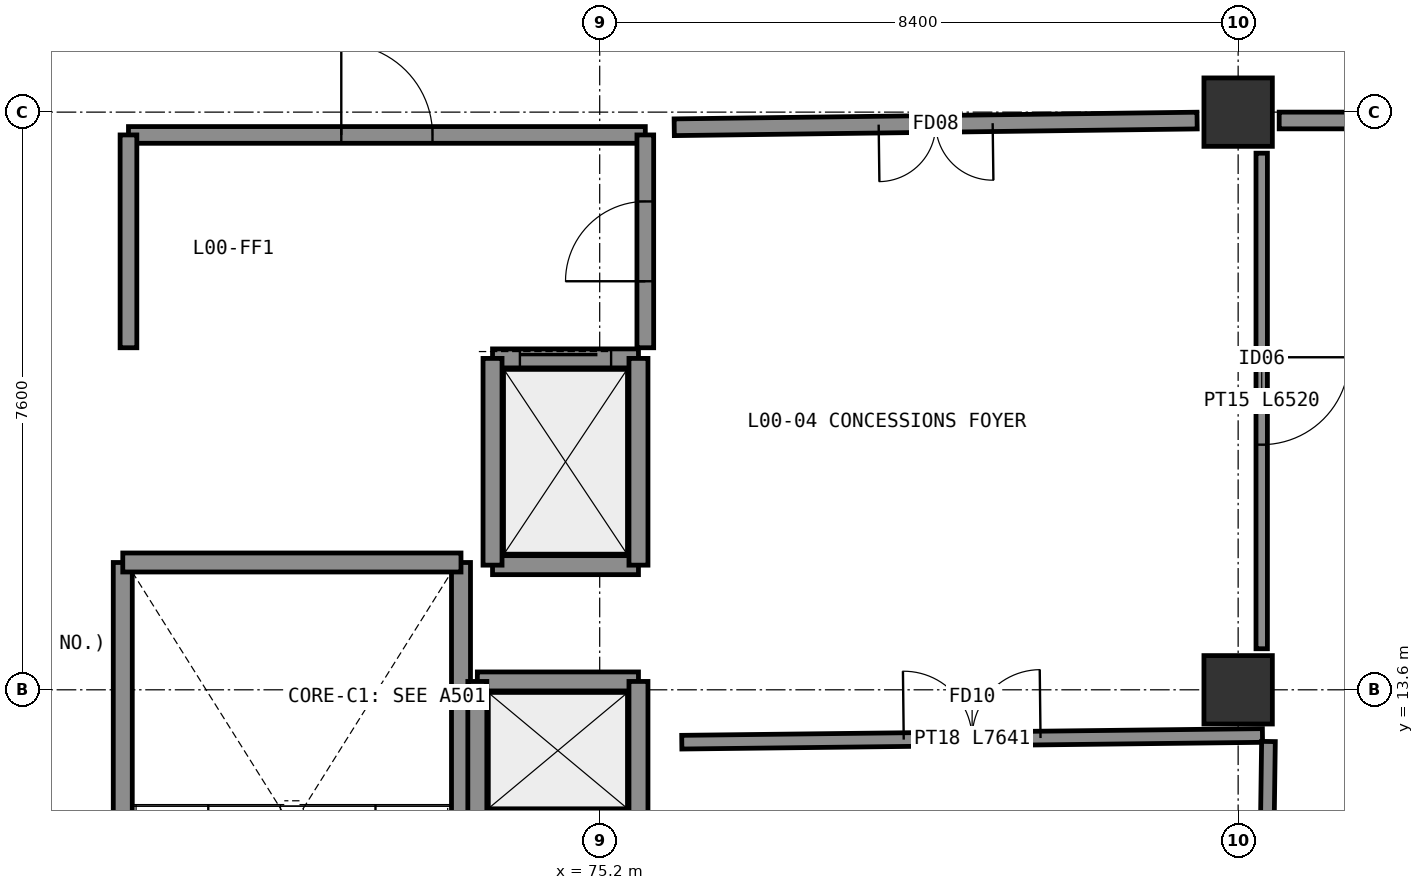
"""IFC4 building model, lengths in metres.
Left out: names, types, materials, properties, quantities, classifications, styles, units other than length and angle.
Written with IfcOpenShell. Run it as: python <this file> out.ifc"""

import sys

from ifc_helpers import new_model, si_unit, direction, frame, frame_2d, origin, origin_2d, place, context, subcontext, project, spatial, rectangle, extrude, element, fill, save


model = new_model("IFC4")
c1 = context("Model", 3, precision=1e-05, world=origin(), true_north=direction((0.0, 1.0)))
c2 = subcontext(c1, "Body", "Model", "MODEL_VIEW")
j1 = project(units=[si_unit("LENGTHUNIT", "METRE"), si_unit("PLANEANGLEUNIT", "RADIAN")], contexts=[c1])
p1 = place(None, origin())
s1 = spatial("IfcSite", under=j1, at=p1, CompositionType="ELEMENT")
p2 = place(p1, origin())
s2 = spatial("IfcBuilding", under=s1, at=p2, CompositionType="ELEMENT")
p3 = place(p2, origin())
s3 = spatial("IfcBuildingStorey", under=s2, at=p3, CompositionType="ELEMENT", Elevation=0.0)
for number, where, z_axis, x_axis in (
    (1, (83.6, 13.6, 0.0), (0.0, 0.0, 1.0), (1.0, 0.0, 0.0)),
    (2, (83.6, 21.2, 0.0), (0.0, 0.0, 1.0), (1.0, 0.0, 0.0)),
):
    element("IfcColumn", number, at=place(p3, frame(where, z_axis=z_axis, x_axis=x_axis)), inside=s3, PredefinedType="COLUMN", context=c2, shape_type="SweptSolid", body=[
        extrude(rectangle(XDim=0.9, YDim=0.9, at=origin_2d()), origin(), (0.0, 0.0, 1.0), 4.8),
    ])
p4 = place(p3, frame((68.925, 6.225, 0.0), z_axis=(0.0, 0.0, 1.0), x_axis=(0.0, 1.0, 0.0)))
e3 = element("IfcWall", 3, at=p4, inside=s3, PredefinedType="SHEAR", context=c2, shape_type="SweptSolid", body=[
    extrude(rectangle(XDim=9.05, YDim=0.25, at=frame_2d((4.525, 0.0))), origin(), (0.0, 0.0, 1.0), 4.52),
])
p5 = place(p4, frame((0.55, 0.0, 0.0)))
e4 = element("IfcOpeningElement", 4, at=p5, cuts=e3, PredefinedType="OPENING", context=c2, shape_type="SweptSolid", body=[
    extrude(rectangle(XDim=1.05, YDim=2.1, at=frame_2d((0.525, 1.05))), frame((0.0, 0.135, 0.0), z_axis=(0.0, -1.0, 0.0), x_axis=(1.0, 0.0, 0.0)), (0.0, 0.0, 1.0), 0.27),
])
p6 = place(p3, frame((73.375, 6.225, 0.0), z_axis=(0.0, 0.0, 1.0), x_axis=(0.0, 1.0, 0.0)))
e5 = element("IfcWall", 5, at=p6, inside=s3, PredefinedType="SHEAR", context=c2, shape_type="SweptSolid", body=[
    extrude(rectangle(XDim=9.05, YDim=0.25, at=frame_2d((4.525, 0.0))), origin(), (0.0, 0.0, 1.0), 4.52),
])
p7 = place(p3, frame((68.925, 15.275, 0.0), z_axis=(0.0, 0.0, 1.0), x_axis=(1.0, 0.0, 0.0)))
e6 = element("IfcWall", 6, at=p7, inside=s3, PredefinedType="SHEAR", context=c2, shape_type="SweptSolid", body=[
    extrude(rectangle(XDim=4.45, YDim=0.25, at=frame_2d((2.225, 0.0))), origin(), (0.0, 0.0, 1.0), 4.52),
])
p8 = place(p3, frame((69.0, 20.9, 0.0), z_axis=(0.0, 0.0, 1.0), x_axis=(1.0, 0.0, 0.0)))
e7 = element("IfcWall", 7, at=p8, inside=s3, PredefinedType="SOLIDWALL", context=c2, shape_type="SweptSolid", body=[
    extrude(rectangle(XDim=6.8, YDim=0.22, at=frame_2d((3.4, 0.0))), origin(), (0.0, 0.0, 1.0), 4.5),
])
p9 = place(p8, frame((2.8, 0.0, 0.0)))
e8 = element("IfcOpeningElement", 8, at=p9, cuts=e7, PredefinedType="OPENING", context=c2, shape_type="SweptSolid", body=[
    extrude(rectangle(XDim=1.2, YDim=2.1, at=frame_2d((0.6, 1.05))), frame((0.0, 0.12, 0.0), z_axis=(0.0, -1.0, 0.0), x_axis=(1.0, 0.0, 0.0)), (0.0, 0.0, 1.0), 0.24),
])
p10 = place(p3, frame((69.0, 18.1, 0.0), z_axis=(0.0, 0.0, 1.0), x_axis=(0.0, 1.0, 0.0)))
e9 = element("IfcWall", 9, at=p10, inside=s3, PredefinedType="SOLIDWALL", context=c2, shape_type="SweptSolid", body=[
    extrude(rectangle(XDim=2.8, YDim=0.22, at=frame_2d((1.4, 0.0))), origin(), (0.0, 0.0, 1.0), 4.5),
])
p11 = place(p3, frame((75.8, 18.1, 0.0), z_axis=(0.0, 0.0, 1.0), x_axis=(0.0, 1.0, 0.0)))
e10 = element("IfcWall", 10, at=p11, inside=s3, PredefinedType="SOLIDWALL", context=c2, shape_type="SweptSolid", body=[
    extrude(rectangle(XDim=2.8, YDim=0.22, at=frame_2d((1.4, 0.0))), origin(), (0.0, 0.0, 1.0), 4.5),
])
p12 = place(p11, frame((0.875, 0.0, 0.0)))
e11 = element("IfcOpeningElement", 11, at=p12, cuts=e10, PredefinedType="OPENING", context=c2, shape_type="SweptSolid", body=[
    extrude(rectangle(XDim=1.05, YDim=2.1, at=frame_2d((0.525, 1.05))), frame((0.0, 0.12, 0.0), z_axis=(0.0, -1.0, 0.0), x_axis=(1.0, 0.0, 0.0)), (0.0, 0.0, 1.0), 0.24),
])
p13 = place(p3, frame((73.59, 11.89, 0.0), z_axis=(0.0, 0.0, 1.0), x_axis=(1.0, 0.0, 0.0)))
e12 = element("IfcWall", 12, at=p13, inside=s3, PredefinedType="SHEAR", context=c2, shape_type="SweptSolid", body=[
    extrude(rectangle(XDim=2.12, YDim=0.25, at=frame_2d((1.06, 0.0))), origin(), (0.0, 0.0, 1.0), 4.52),
])
p14 = place(p13, frame((0.51, 0.0, 0.0)))
e13 = element("IfcOpeningElement", 13, at=p14, cuts=e12, PredefinedType="OPENING", context=c2, shape_type="SweptSolid", body=[
    extrude(rectangle(XDim=1.1, YDim=2.15, at=frame_2d((0.55, 1.075))), frame((0.0, 0.135, 0.0), z_axis=(0.0, -1.0, 0.0), x_axis=(1.0, 0.0, 0.0)), (0.0, 0.0, 1.0), 0.27),
])
p15 = place(p3, frame((73.59, 13.71, 0.0), z_axis=(0.0, 0.0, 1.0), x_axis=(1.0, 0.0, 0.0)))
e14 = element("IfcWall", 14, at=p15, inside=s3, PredefinedType="SHEAR", context=c2, shape_type="SweptSolid", body=[
    extrude(rectangle(XDim=2.12, YDim=0.25, at=frame_2d((1.06, 0.0))), origin(), (0.0, 0.0, 1.0), 4.52),
])
for number, where, z_axis, x_axis in (
    (15, (73.59, 11.89, 0.0), (0.0, 0.0, 1.0), (0.0, 1.0, 0.0)),
    (16, (75.71, 11.89, 0.0), (0.0, 0.0, 1.0), (0.0, 1.0, 0.0)),
):
    element("IfcWall", number, at=place(p3, frame(where, z_axis=z_axis, x_axis=x_axis)), inside=s3, PredefinedType="SHEAR", context=c2, shape_type="SweptSolid", body=[
        extrude(rectangle(XDim=1.82, YDim=0.25, at=frame_2d((0.91, 0.0))), origin(), (0.0, 0.0, 1.0), 4.52),
    ])
p16 = place(p3, frame((73.79, 15.24, 0.0), z_axis=(0.0, 0.0, 1.0), x_axis=(1.0, 0.0, 0.0)))
e17 = element("IfcWall", 17, at=p16, inside=s3, PredefinedType="SHEAR", context=c2, shape_type="SweptSolid", body=[
    extrude(rectangle(XDim=1.92, YDim=0.25, at=frame_2d((0.96, 0.0))), origin(), (0.0, 0.0, 1.0), 4.52),
])
p17 = place(p3, frame((73.79, 17.96, 0.0), z_axis=(0.0, 0.0, 1.0), x_axis=(1.0, 0.0, 0.0)))
e18 = element("IfcWall", 18, at=p17, inside=s3, PredefinedType="SHEAR", context=c2, shape_type="SweptSolid", body=[
    extrude(rectangle(XDim=1.92, YDim=0.25, at=frame_2d((0.96, 0.0))), origin(), (0.0, 0.0, 1.0), 4.52),
])
p18 = place(p17, frame((0.36, 0.0, 0.0)))
e19 = element("IfcOpeningElement", 19, at=p18, cuts=e18, PredefinedType="OPENING", context=c2, shape_type="SweptSolid", body=[
    extrude(rectangle(XDim=1.2, YDim=2.2, at=frame_2d((0.6, 1.1))), frame((0.0, 0.135, 0.0), z_axis=(0.0, -1.0, 0.0), x_axis=(1.0, 0.0, 0.0)), (0.0, 0.0, 1.0), 0.27),
])
for number, where, z_axis, x_axis in (
    (20, (73.79, 15.24, 0.0), (0.0, 0.0, 1.0), (0.0, 1.0, 0.0)),
    (21, (75.71, 15.24, 0.0), (0.0, 0.0, 1.0), (0.0, 1.0, 0.0)),
):
    element("IfcWall", number, at=place(p3, frame(where, z_axis=z_axis, x_axis=x_axis)), inside=s3, PredefinedType="SHEAR", context=c2, shape_type="SweptSolid", body=[
        extrude(rectangle(XDim=2.72, YDim=0.25, at=frame_2d((1.36, 0.0))), origin(), (0.0, 0.0, 1.0), 4.52),
    ])
p19 = place(p3, frame((76.28, 12.911, 0.0), z_axis=(0.0, 0.0, 1.0), x_axis=(0.999933465536, 0.01153535874, 0.0)))
e22 = element("IfcWall", 22, at=p19, inside=s3, PredefinedType="PARTITIONING", context=c2, shape_type="SweptSolid", body=[
    extrude(rectangle(XDim=7.64, YDim=0.18, at=frame_2d((3.82, 0.0))), origin(), (0.0, 0.0, 1.0), 4.5),
])
p20 = place(p19, frame((2.92, 0.0, 0.0)))
e23 = element("IfcOpeningElement", 23, at=p20, cuts=e22, PredefinedType="OPENING", context=c2, shape_type="SweptSolid", body=[
    extrude(rectangle(XDim=1.8, YDim=2.2, at=frame_2d((0.9, 1.1))), frame((0.0, 0.1, 0.0), z_axis=(0.0, -1.0, 0.0), x_axis=(1.0, 0.0, 0.0)), (0.0, 0.0, 1.0), 0.2),
])
p21 = place(p3, frame((83.999, 12.92, 0.0), z_axis=(0.0, 0.0, 1.0), x_axis=(-0.013736649608, -0.999905647778, 0.0)))
e24 = element("IfcWall", 24, at=p21, inside=s3, PredefinedType="PARTITIONING", context=c2, shape_type="SweptSolid", body=[
    extrude(rectangle(XDim=6.38, YDim=0.18, at=frame_2d((3.19, 0.0))), origin(), (0.0, 0.0, 1.0), 4.5),
])
p22 = place(p21, frame((2.24, 0.0, 0.0)))
e25 = element("IfcOpeningElement", 25, at=p22, cuts=e24, PredefinedType="OPENING", context=c2, shape_type="SweptSolid", body=[
    extrude(rectangle(XDim=1.9, YDim=2.2, at=frame_2d((0.95, 1.1))), frame((0.0, 0.1, 0.0), z_axis=(0.0, -1.0, 0.0), x_axis=(1.0, 0.0, 0.0)), (0.0, 0.0, 1.0), 0.2),
])
p23 = place(p3, frame((83.06, 21.089, 0.0), z_axis=(0.0, 0.0, 1.0), x_axis=(-0.99991794977, -0.012809907373, 0.0)))
e26 = element("IfcWall", 26, at=p23, inside=s3, PredefinedType="SOLIDWALL", context=c2, shape_type="SweptSolid", body=[
    extrude(rectangle(XDim=6.88, YDim=0.22, at=frame_2d((3.44, 0.0))), origin(), (0.0, 0.0, 1.0), 3.659),
])
p24 = place(p23, frame((2.69, 0.0, 0.0)))
e27 = element("IfcOpeningElement", 27, at=p24, cuts=e26, PredefinedType="OPENING", context=c2, shape_type="SweptSolid", body=[
    extrude(rectangle(XDim=1.5, YDim=2.15, at=frame_2d((0.75, 1.075))), frame((0.0, 0.12, 0.0), z_axis=(0.0, -1.0, 0.0), x_axis=(1.0, 0.0, 0.0)), (0.0, 0.0, 1.0), 0.24),
])
p25 = place(p3, frame((91.46, 21.09, 0.0), z_axis=(0.0, 0.0, 1.0), x_axis=(-1.0, 0.0, 0.0)))
e28 = element("IfcWall", 28, at=p25, inside=s3, PredefinedType="SOLIDWALL", context=c2, shape_type="SweptSolid", body=[
    extrude(rectangle(XDim=7.32, YDim=0.22, at=frame_2d((3.66, 0.0))), origin(), (0.0, 0.0, 1.0), 3.81),
])
p26 = place(p25, frame((2.86, 0.0, 0.0)))
e29 = element("IfcOpeningElement", 29, at=p26, cuts=e28, PredefinedType="OPENING", context=c2, shape_type="SweptSolid", body=[
    extrude(rectangle(XDim=1.6, YDim=2.2, at=frame_2d((0.8, 1.1))), frame((0.0, 0.12, 0.0), z_axis=(0.0, -1.0, 0.0), x_axis=(1.0, 0.0, 0.0)), (0.0, 0.0, 1.0), 0.24),
])
p27 = place(p3, frame((83.91, 20.66, 0.0), z_axis=(0.0, 0.0, 1.0), x_axis=(0.0, -1.0, 0.0)))
e30 = element("IfcWall", 30, at=p27, inside=s3, PredefinedType="PARTITIONING", context=c2, shape_type="SweptSolid", body=[
    extrude(rectangle(XDim=6.52, YDim=0.15, at=frame_2d((3.26, 0.0))), origin(), (0.0, 0.0, 1.0), 4.5),
])
p28 = place(p27, frame((2.685, 0.0, 0.0)))
e31 = element("IfcOpeningElement", 31, at=p28, cuts=e30, PredefinedType="OPENING", context=c2, shape_type="SweptSolid", body=[
    extrude(rectangle(XDim=1.15, YDim=2.12, at=frame_2d((0.575, 1.06))), frame((0.0, 0.085, 0.0), z_axis=(0.0, -1.0, 0.0), x_axis=(1.0, 0.0, 0.0)), (0.0, 0.0, 1.0), 0.17),
])
p29 = place(p9, origin())
e32 = element("IfcDoor", 32, at=p29, inside=s3, OperationType="SINGLE_SWING_LEFT", PredefinedType="DOOR", context=c2, shape_type="SweptSolid", body=[
    extrude(rectangle(XDim=1.2, YDim=2.1, at=frame_2d((0.6, 1.05))), frame((0.0, 0.025, 0.0), z_axis=(0.0, -1.0, 0.0), x_axis=(1.0, 0.0, 0.0)), (0.0, 0.0, 1.0), 0.05),
])
fill(e8, e32)
p30 = place(p12, origin())
e33 = element("IfcDoor", 33, at=p30, inside=s3, OperationType="SINGLE_SWING_LEFT", PredefinedType="DOOR", context=c2, shape_type="SweptSolid", body=[
    extrude(rectangle(XDim=1.05, YDim=2.1, at=frame_2d((0.525, 1.05))), frame((0.0, 0.025, 0.0), z_axis=(0.0, -1.0, 0.0), x_axis=(1.0, 0.0, 0.0)), (0.0, 0.0, 1.0), 0.05),
])
fill(e11, e33)
p31 = place(p18, origin())
e34 = element("IfcDoor", 34, at=p31, inside=s3, OperationType="SLIDING_TO_LEFT", PredefinedType="DOOR", context=c2, shape_type="SweptSolid", body=[
    extrude(rectangle(XDim=1.2, YDim=2.2, at=frame_2d((0.6, 1.1))), frame((0.0, 0.025, 0.0), z_axis=(0.0, -1.0, 0.0), x_axis=(1.0, 0.0, 0.0)), (0.0, 0.0, 1.0), 0.05),
])
fill(e19, e34)
p32 = place(p20, origin())
e35 = element("IfcDoor", 35, at=p32, inside=s3, OperationType="DOUBLE_DOOR_SINGLE_SWING", PredefinedType="DOOR", context=c2, shape_type="SweptSolid", body=[
    extrude(rectangle(XDim=1.8, YDim=2.2, at=frame_2d((0.9, 1.1))), frame((0.0, 0.025, 0.0), z_axis=(0.0, -1.0, 0.0), x_axis=(1.0, 0.0, 0.0)), (0.0, 0.0, 1.0), 0.05),
])
fill(e23, e35)
p33 = place(p24, origin())
e36 = element("IfcDoor", 36, at=p33, inside=s3, OperationType="DOUBLE_DOOR_SINGLE_SWING", PredefinedType="DOOR", context=c2, shape_type="SweptSolid", body=[
    extrude(rectangle(XDim=1.5, YDim=2.15, at=frame_2d((0.75, 1.075))), frame((0.0, 0.025, 0.0), z_axis=(0.0, -1.0, 0.0), x_axis=(1.0, 0.0, 0.0)), (0.0, 0.0, 1.0), 0.05),
])
fill(e27, e36)
p34 = place(p28, origin())
e37 = element("IfcDoor", 37, at=p34, inside=s3, OperationType="SINGLE_SWING_LEFT", PredefinedType="DOOR", context=c2, shape_type="SweptSolid", body=[
    extrude(rectangle(XDim=1.15, YDim=2.12, at=frame_2d((0.575, 1.06))), frame((0.0, 0.025, 0.0), z_axis=(0.0, -1.0, 0.0), x_axis=(1.0, 0.0, 0.0)), (0.0, 0.0, 1.0), 0.05),
])
fill(e31, e37)
save(model, sys.argv[1])
